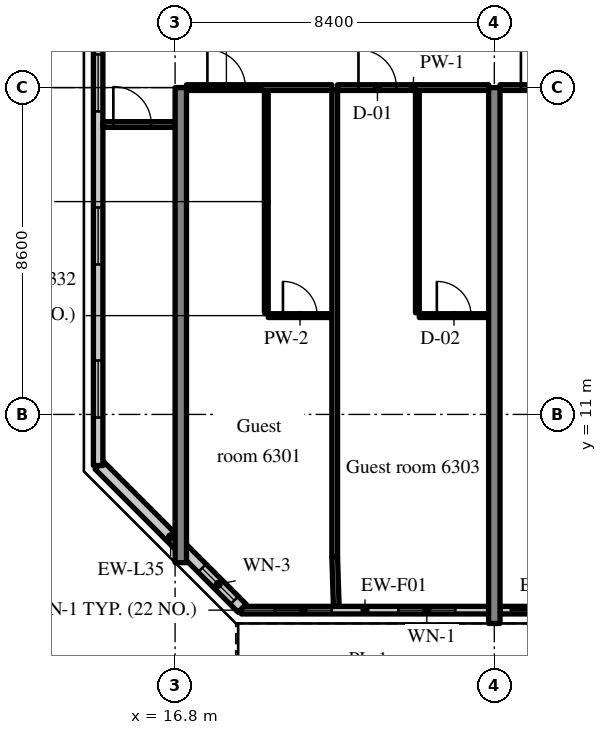
"""IFC4 building model, lengths in metres.
Left out: names, types, materials, properties, quantities, classifications, styles, units other than length and angle.
Written with IfcOpenShell. Run it as: python <this file> out.ifc"""

import sys

from ifc_helpers import new_model, si_unit, direction, frame, frame_2d, origin, place, context, subcontext, project, spatial, rectangle, extrude, source, transform, mapped, element, fill, save


model = new_model("IFC4")
c1 = context("Model", 3, precision=1e-05, world=origin(), true_north=direction((0.0, 1.0)))
c2 = subcontext(c1, "Body", "Model", "MODEL_VIEW")
j1 = project(units=[si_unit("LENGTHUNIT", "METRE"), si_unit("PLANEANGLEUNIT", "RADIAN")], contexts=[c1])
p1 = place(None, origin())
s1 = spatial("IfcSite", under=j1, at=p1, CompositionType="ELEMENT")
p2 = place(p1, origin())
s2 = spatial("IfcBuilding", under=s1, at=p2, CompositionType="ELEMENT")
p3 = place(p2, frame((0.0, 0.0, 260.8)))
s3 = spatial("IfcBuildingStorey", under=s2, at=p3, CompositionType="ELEMENT", Elevation=260.8)
m1 = source(origin(), c2, "Body", "SweptSolid", [
    extrude(rectangle(XDim=12.5, YDim=0.3, at=frame_2d((6.25, 0.0))), origin(), (0.0, 0.0, 1.0), 3.62),
])
p4 = place(p3, frame((16.95, 7.1, 0.0), z_axis=(0.0, 0.0, 1.0), x_axis=(0.0, 1.0, 0.0)))
e1 = element("IfcWall", 1, at=p4, inside=s3, PredefinedType="SHEAR", context=c2, shape_type="MappedRepresentation", body=[
    mapped(m1, transform((0.0, 0.0, 0.0), scale=1.0)),
])
m2 = source(origin(), c2, "Body", "SweptSolid", [
    extrude(rectangle(XDim=14.1, YDim=0.3, at=frame_2d((7.05, 0.0))), origin(), (0.0, 0.0, 1.0), 3.62),
])
p5 = place(p3, frame((25.2, 5.5, 0.0), z_axis=(0.0, 0.0, 1.0), x_axis=(0.0, 1.0, 0.0)))
e2 = element("IfcWall", 2, at=p5, inside=s3, PredefinedType="SHEAR", context=c2, shape_type="MappedRepresentation", body=[
    mapped(m2, transform((0.0, 0.0, 0.0), scale=1.0)),
])
m3 = source(origin(), c2, "Body", "SweptSolid", [
    extrude(rectangle(XDim=6.505, YDim=0.2, at=frame_2d((3.252, 0.0))), origin(), (0.0, 0.0, 1.0), 3.02),
])
p6 = place(p3, frame((18.545, 5.85, 0.0), z_axis=(0.0, 0.0, 1.0), x_axis=(1.0, 0.0, 0.0)))
e3 = element("IfcWall", 3, at=p6, inside=s3, PredefinedType="SOLIDWALL", context=c2, shape_type="MappedRepresentation", body=[
    mapped(m3, transform((0.0, 0.0, 0.0), scale=1.0)),
])
m4 = source(origin(), c2, "Body", "SweptSolid", [
    extrude(rectangle(XDim=1.5, YDim=1.5, at=frame_2d((0.75, 0.75))), frame((0.0, 0.11, 0.0), z_axis=(0.0, -1.0, 0.0), x_axis=(1.0, 0.0, 0.0)), (0.0, 0.0, 1.0), 0.22),
])
p7 = place(p6, frame((0.876, 0.0, 0.9)))
e4 = element("IfcOpeningElement", 4, at=p7, cuts=e3, PredefinedType="OPENING", context=c2, shape_type="MappedRepresentation", body=[
    mapped(m4, transform((0.0, 0.0, 0.0), scale=1.0)),
])
p8 = place(p6, frame((4.129, 0.0, 0.9)))
e5 = element("IfcOpeningElement", 5, at=p8, cuts=e3, PredefinedType="OPENING", context=c2, shape_type="MappedRepresentation", body=[
    mapped(m4, transform((0.0, 0.0, 0.0), scale=1.0)),
])
m5 = source(origin(), c2, "Body", "SweptSolid", [
    extrude(rectangle(XDim=8.1, YDim=0.2, at=frame_2d((4.05, 0.0))), origin(), (0.0, 0.0, 1.0), 3.02),
])
p9 = place(p3, frame((25.35, 5.85, 0.0), z_axis=(0.0, 0.0, 1.0), x_axis=(1.0, 0.0, 0.0)))
e6 = element("IfcWall", 6, at=p9, inside=s3, PredefinedType="SOLIDWALL", context=c2, shape_type="MappedRepresentation", body=[
    mapped(m5, transform((0.0, 0.0, 0.0), scale=1.0)),
])
m6 = source(origin(), c2, "Body", "SweptSolid", [
    extrude(rectangle(XDim=1.2, YDim=2.4, at=frame_2d((0.6, 1.2))), frame((0.0, 0.11, 0.0), z_axis=(0.0, -1.0, 0.0), x_axis=(1.0, 0.0, 0.0)), (0.0, 0.0, 1.0), 0.22),
])
p10 = place(p9, frame((0.25, 0.0, 0.0)))
e7 = element("IfcOpeningElement", 7, at=p10, cuts=e6, PredefinedType="OPENING", context=c2, shape_type="MappedRepresentation", body=[
    mapped(m6, transform((0.0, 0.0, 0.0), scale=1.0)),
])
p11 = place(p9, frame((2.3, 0.0, 0.9)))
e8 = element("IfcOpeningElement", 8, at=p11, cuts=e6, PredefinedType="OPENING", context=c2, shape_type="MappedRepresentation", body=[
    mapped(m4, transform((0.0, 0.0, 0.0), scale=1.0)),
])
p12 = place(p9, frame((4.3, 0.0, 0.0)))
e9 = element("IfcOpeningElement", 9, at=p12, cuts=e6, PredefinedType="OPENING", context=c2, shape_type="MappedRepresentation", body=[
    mapped(m6, transform((0.0, 0.0, 0.0), scale=1.0)),
])
p13 = place(p9, frame((6.35, 0.0, 0.9)))
e10 = element("IfcOpeningElement", 10, at=p13, cuts=e6, PredefinedType="OPENING", context=c2, shape_type="MappedRepresentation", body=[
    mapped(m4, transform((0.0, 0.0, 0.0), scale=1.0)),
])
m7 = source(origin(), c2, "Body", "SweptSolid", [
    extrude(rectangle(XDim=5.326, YDim=0.3, at=frame_2d((2.663, 0.0))), origin(), (0.0, 0.0, 1.0), 3.62),
])
p14 = place(p3, frame((14.8, 9.666, 0.0), z_axis=(0.0, 0.0, 1.0), x_axis=(0.707083859269, -0.707129702361, 0.0)))
e11 = element("IfcWall", 11, at=p14, inside=s3, PredefinedType="SOLIDWALL", context=c2, shape_type="MappedRepresentation", body=[
    mapped(m7, transform((0.0, 0.0, 0.0), scale=1.0)),
])
m8 = source(origin(), c2, "Body", "SweptSolid", [
    extrude(rectangle(XDim=1.2, YDim=1.5, at=frame_2d((0.6, 0.75))), frame((0.0, 0.16, 0.0), z_axis=(0.0, -1.0, 0.0), x_axis=(1.0, 0.0, 0.0)), (0.0, 0.0, 1.0), 0.32),
])
p15 = place(p14, frame((3.833, 0.0, 0.9)))
e12 = element("IfcOpeningElement", 12, at=p15, cuts=e11, PredefinedType="OPENING", context=c2, shape_type="MappedRepresentation", body=[
    mapped(m8, transform((0.0, 0.0, 0.0), scale=1.0)),
])
m9 = source(origin(), c2, "Body", "SweptSolid", [
    extrude(rectangle(XDim=28.189, YDim=0.25, at=frame_2d((14.095, 0.0))), origin(), (0.0, 0.0, 1.0), 3.62),
])
p16 = place(p3, frame((14.775, 37.845, 0.0), z_axis=(0.0, 0.0, 1.0), x_axis=(0.0, -1.0, 0.0)))
e13 = element("IfcWall", 13, at=p16, inside=s3, PredefinedType="SOLIDWALL", context=c2, shape_type="MappedRepresentation", body=[
    mapped(m9, transform((0.0, 0.0, 0.0), scale=1.0)),
])
m10 = source(origin(), c2, "Body", "SweptSolid", [
    extrude(rectangle(XDim=1.5, YDim=1.5, at=frame_2d((0.75, 0.75))), frame((0.0, 0.135, 0.0), z_axis=(0.0, -1.0, 0.0), x_axis=(1.0, 0.0, 0.0)), (0.0, 0.0, 1.0), 0.27),
])
p17 = place(p16, frame((1.263, 0.0, 0.9)))
e14 = element("IfcOpeningElement", 14, at=p17, cuts=e13, PredefinedType="OPENING", context=c2, shape_type="MappedRepresentation", body=[
    mapped(m10, transform((0.0, 0.0, 0.0), scale=1.0)),
])
p18 = place(p16, frame((5.291, 0.0, 0.9)))
e15 = element("IfcOpeningElement", 15, at=p18, cuts=e13, PredefinedType="OPENING", context=c2, shape_type="MappedRepresentation", body=[
    mapped(m10, transform((0.0, 0.0, 0.0), scale=1.0)),
])
p19 = place(p16, frame((9.318, 0.0, 0.9)))
e16 = element("IfcOpeningElement", 16, at=p19, cuts=e13, PredefinedType="OPENING", context=c2, shape_type="MappedRepresentation", body=[
    mapped(m10, transform((0.0, 0.0, 0.0), scale=1.0)),
])
p20 = place(p16, frame((13.345, 0.0, 0.9)))
e17 = element("IfcOpeningElement", 17, at=p20, cuts=e13, PredefinedType="OPENING", context=c2, shape_type="MappedRepresentation", body=[
    mapped(m10, transform((0.0, 0.0, 0.0), scale=1.0)),
])
p21 = place(p16, frame((17.372, 0.0, 0.9)))
e18 = element("IfcOpeningElement", 18, at=p21, cuts=e13, PredefinedType="OPENING", context=c2, shape_type="MappedRepresentation", body=[
    mapped(m10, transform((0.0, 0.0, 0.0), scale=1.0)),
])
p22 = place(p16, frame((21.399, 0.0, 0.9)))
e19 = element("IfcOpeningElement", 19, at=p22, cuts=e13, PredefinedType="OPENING", context=c2, shape_type="MappedRepresentation", body=[
    mapped(m10, transform((0.0, 0.0, 0.0), scale=1.0)),
])
p23 = place(p16, frame((25.426, 0.0, 0.9)))
e20 = element("IfcOpeningElement", 20, at=p23, cuts=e13, PredefinedType="OPENING", context=c2, shape_type="MappedRepresentation", body=[
    mapped(m10, transform((0.0, 0.0, 0.0), scale=1.0)),
])
m11 = source(origin(), c2, "Body", "SweptSolid", [
    extrude(rectangle(XDim=5.85, YDim=0.1, at=frame_2d((2.925, 0.0))), origin(), (0.0, 0.0, 1.0), 3.62),
])
p24 = place(p3, frame((19.2, 13.675, 0.0), z_axis=(0.0, 0.0, 1.0), x_axis=(0.0, 1.0, 0.0)))
e21 = element("IfcWall", 21, at=p24, inside=s3, PredefinedType="PARTITIONING", context=c2, shape_type="MappedRepresentation", body=[
    mapped(m11, transform((0.0, 0.0, 0.0), scale=1.0)),
])
m12 = source(origin(), c2, "Body", "SweptSolid", [
    extrude(rectangle(XDim=1.675, YDim=0.1, at=frame_2d((0.837, 0.0))), origin(), (0.0, 0.0, 1.0), 3.62),
])
p25 = place(p3, frame((19.25, 13.6, 0.0), z_axis=(0.0, 0.0, 1.0), x_axis=(1.0, 0.0, 0.0)))
e22 = element("IfcWall", 22, at=p25, inside=s3, PredefinedType="PARTITIONING", context=c2, shape_type="MappedRepresentation", body=[
    mapped(m12, transform((0.0, 0.0, 0.0), scale=1.0)),
])
m13 = source(origin(), c2, "Body", "SweptSolid", [
    extrude(rectangle(XDim=0.9, YDim=2.1, at=frame_2d((0.45, 1.05))), frame((0.0, 0.06, 0.0), z_axis=(0.0, -1.0, 0.0), x_axis=(1.0, 0.0, 0.0)), (0.0, 0.0, 1.0), 0.12),
])
p26 = place(p25, frame((0.388, 0.0, 0.0)))
e23 = element("IfcOpeningElement", 23, at=p26, cuts=e22, PredefinedType="OPENING", context=c2, shape_type="MappedRepresentation", body=[
    mapped(m13, transform((0.0, 0.0, 0.0), scale=1.0)),
])
m14 = source(origin(), c2, "Body", "SweptSolid", [
    extrude(rectangle(XDim=3.825, YDim=0.15, at=frame_2d((1.913, 0.0))), origin(), (0.0, 0.0, 1.0), 2.92),
])
p27 = place(p3, frame((17.1, 19.6, 0.0), z_axis=(0.0, 0.0, 1.0), x_axis=(1.0, 0.0, 0.0)))
e24 = element("IfcWall", 24, at=p27, inside=s3, PredefinedType="PARTITIONING", context=c2, shape_type="MappedRepresentation", body=[
    mapped(m14, transform((0.0, 0.0, 0.0), scale=1.0)),
])
m15 = source(origin(), c2, "Body", "SweptSolid", [
    extrude(rectangle(XDim=1.0, YDim=2.1, at=frame_2d((0.5, 1.05))), frame((0.0, 0.085, 0.0), z_axis=(0.0, -1.0, 0.0), x_axis=(1.0, 0.0, 0.0)), (0.0, 0.0, 1.0), 0.17),
])
p28 = place(p27, frame((0.55, 0.0, 0.0)))
e25 = element("IfcOpeningElement", 25, at=p28, cuts=e24, PredefinedType="OPENING", context=c2, shape_type="MappedRepresentation", body=[
    mapped(m15, transform((0.0, 0.0, 0.0), scale=1.0)),
])
p29 = place(p3, frame((23.175, 13.675, 0.0), z_axis=(0.0, 0.0, 1.0), x_axis=(0.0, 1.0, 0.0)))
e26 = element("IfcWall", 26, at=p29, inside=s3, PredefinedType="PARTITIONING", context=c2, shape_type="MappedRepresentation", body=[
    mapped(m11, transform((0.0, 0.0, 0.0), scale=1.0)),
])
m16 = source(origin(), c2, "Body", "SweptSolid", [
    extrude(rectangle(XDim=1.825, YDim=0.1, at=frame_2d((0.913, 0.0))), origin(), (0.0, 0.0, 1.0), 3.62),
])
p30 = place(p3, frame((23.225, 13.6, 0.0), z_axis=(0.0, 0.0, 1.0), x_axis=(1.0, 0.0, 0.0)))
e27 = element("IfcWall", 27, at=p30, inside=s3, PredefinedType="PARTITIONING", context=c2, shape_type="MappedRepresentation", body=[
    mapped(m16, transform((0.0, 0.0, 0.0), scale=1.0)),
])
p31 = place(p30, frame((0.463, 0.0, 0.0)))
e28 = element("IfcOpeningElement", 28, at=p31, cuts=e27, PredefinedType="OPENING", context=c2, shape_type="MappedRepresentation", body=[
    mapped(m13, transform((0.0, 0.0, 0.0), scale=1.0)),
])
m17 = source(origin(), c2, "Body", "SweptSolid", [
    extrude(rectangle(XDim=3.975, YDim=0.15, at=frame_2d((1.988, 0.0))), origin(), (0.0, 0.0, 1.0), 2.92),
])
p32 = place(p3, frame((21.075, 19.6, 0.0), z_axis=(0.0, 0.0, 1.0), x_axis=(1.0, 0.0, 0.0)))
e29 = element("IfcWall", 29, at=p32, inside=s3, PredefinedType="PARTITIONING", context=c2, shape_type="MappedRepresentation", body=[
    mapped(m17, transform((0.0, 0.0, 0.0), scale=1.0)),
])
p33 = place(p32, frame((0.55, 0.0, 0.0)))
e30 = element("IfcOpeningElement", 30, at=p33, cuts=e29, PredefinedType="OPENING", context=c2, shape_type="MappedRepresentation", body=[
    mapped(m15, transform((0.0, 0.0, 0.0), scale=1.0)),
])
m18 = source(origin(), c2, "Body", "SweptSolid", [
    extrude(rectangle(XDim=12.275, YDim=0.15, at=frame_2d((6.137, 0.0))), origin(), (0.0, 0.0, 1.0), 3.62),
])
p34 = place(p3, frame((21.0, 7.25, 0.0), z_axis=(0.0, 0.0, 1.0), x_axis=(0.0, 1.0, 0.0)))
e31 = element("IfcWall", 31, at=p34, inside=s3, PredefinedType="PARTITIONING", context=c2, shape_type="MappedRepresentation", body=[
    mapped(m18, transform((0.0, 0.0, 0.0), scale=1.0)),
])
m19 = source(origin(), c2, "Body", "SweptSolid", [
    extrude(rectangle(XDim=8.1, YDim=0.15, at=frame_2d((4.05, 0.0))), origin(), (0.0, 0.0, 1.0), 2.92),
])
p35 = place(p3, frame((25.35, 19.6, 0.0), z_axis=(0.0, 0.0, 1.0), x_axis=(1.0, 0.0, 0.0)))
e32 = element("IfcWall", 32, at=p35, inside=s3, PredefinedType="PARTITIONING", context=c2, shape_type="MappedRepresentation", body=[
    mapped(m19, transform((0.0, 0.0, 0.0), scale=1.0)),
])
p36 = place(p35, frame((0.55, 0.0, 0.0)))
e33 = element("IfcOpeningElement", 33, at=p36, cuts=e32, PredefinedType="OPENING", context=c2, shape_type="MappedRepresentation", body=[
    mapped(m15, transform((0.0, 0.0, 0.0), scale=1.0)),
])
m20 = source(origin(), c2, "Body", "SweptSolid", [
    extrude(rectangle(XDim=1.9, YDim=0.15, at=frame_2d((0.95, 0.0))), origin(), (0.0, 0.0, 1.0), 2.92),
])
p37 = place(p3, frame((14.9, 18.628, 0.0), z_axis=(0.0, 0.0, 1.0), x_axis=(1.0, 0.0, 0.0)))
e34 = element("IfcWall", 34, at=p37, inside=s3, PredefinedType="PARTITIONING", context=c2, shape_type="MappedRepresentation", body=[
    mapped(m20, transform((0.0, 0.0, 0.0), scale=1.0)),
])
p38 = place(p37, frame((0.275, 0.0, 0.0)))
e35 = element("IfcOpeningElement", 35, at=p38, cuts=e34, PredefinedType="OPENING", context=c2, shape_type="MappedRepresentation", body=[
    mapped(m15, transform((0.0, 0.0, 0.0), scale=1.0)),
])
m21 = source(origin(), c2, "Body", "SweptSolid", [
    extrude(rectangle(XDim=1.301, YDim=0.15, at=frame_2d((0.65, 0.0))), origin(), (0.0, 0.0, 1.0), 3.62),
])
p39 = place(p3, frame((21.041, 5.95, 0.0), z_axis=(0.0, 0.0, 1.0), x_axis=(-0.031533606063, 0.999502692187, 0.0)))
e36 = element("IfcWall", 36, at=p39, inside=s3, PredefinedType="PARTITIONING", context=c2, shape_type="MappedRepresentation", body=[
    mapped(m21, transform((0.0, 0.0, 0.0), scale=1.0)),
])
m22 = source(origin(), c2, "Body", "SweptSolid", [
    extrude(rectangle(XDim=1.5, YDim=1.5, at=frame_2d((0.75, 0.75))), frame((0.0, 0.03, 0.0), z_axis=(0.0, -1.0, 0.0), x_axis=(1.0, 0.0, 0.0)), (0.0, 0.0, 1.0), 0.06),
])
p40 = place(p7, origin())
e37 = element("IfcWindow", 37, at=p40, inside=s3, PartitioningType="SINGLE_PANEL", PredefinedType="WINDOW", context=c2, shape_type="MappedRepresentation", body=[
    mapped(m22, transform((0.0, 0.0, 0.0), scale=1.0)),
])
fill(e4, e37)
p41 = place(p8, origin())
e38 = element("IfcWindow", 38, at=p41, inside=s3, PartitioningType="SINGLE_PANEL", PredefinedType="WINDOW", context=c2, shape_type="MappedRepresentation", body=[
    mapped(m22, transform((0.0, 0.0, 0.0), scale=1.0)),
])
fill(e5, e38)
m23 = source(origin(), c2, "Body", "SweptSolid", [
    extrude(rectangle(XDim=1.2, YDim=2.4, at=frame_2d((0.6, 1.2))), frame((0.0, 0.025, 0.0), z_axis=(0.0, -1.0, 0.0), x_axis=(1.0, 0.0, 0.0)), (0.0, 0.0, 1.0), 0.05),
])
p42 = place(p10, origin())
e39 = element("IfcDoor", 39, at=p42, inside=s3, OperationType="SLIDING_TO_LEFT", PredefinedType="DOOR", context=c2, shape_type="MappedRepresentation", body=[
    mapped(m23, transform((0.0, 0.0, 0.0), scale=1.0)),
])
fill(e7, e39)
m24 = source(origin(), c2, "Body", "SweptSolid", [
    extrude(rectangle(XDim=1.2, YDim=1.5, at=frame_2d((0.6, 0.75))), frame((0.0, 0.03, 0.0), z_axis=(0.0, -1.0, 0.0), x_axis=(1.0, 0.0, 0.0)), (0.0, 0.0, 1.0), 0.06),
])
p43 = place(p15, origin())
e40 = element("IfcWindow", 40, at=p43, inside=s3, PartitioningType="SINGLE_PANEL", PredefinedType="WINDOW", context=c2, shape_type="MappedRepresentation", body=[
    mapped(m24, transform((0.0, 0.0, 0.0), scale=1.0)),
])
fill(e12, e40)
p44 = place(p21, origin())
e41 = element("IfcWindow", 41, at=p44, inside=s3, PartitioningType="SINGLE_PANEL", PredefinedType="WINDOW", context=c2, shape_type="MappedRepresentation", body=[
    mapped(m22, transform((0.0, 0.0, 0.0), scale=1.0)),
])
fill(e18, e41)
p45 = place(p22, origin())
e42 = element("IfcWindow", 42, at=p45, inside=s3, PartitioningType="SINGLE_PANEL", PredefinedType="WINDOW", context=c2, shape_type="MappedRepresentation", body=[
    mapped(m22, transform((0.0, 0.0, 0.0), scale=1.0)),
])
fill(e19, e42)
p46 = place(p23, origin())
e43 = element("IfcWindow", 43, at=p46, inside=s3, PartitioningType="SINGLE_PANEL", PredefinedType="WINDOW", context=c2, shape_type="MappedRepresentation", body=[
    mapped(m22, transform((0.0, 0.0, 0.0), scale=1.0)),
])
fill(e20, e43)
m25 = source(origin(), c2, "Body", "SweptSolid", [
    extrude(rectangle(XDim=0.9, YDim=2.1, at=frame_2d((0.45, 1.05))), frame((0.0, 0.025, 0.0), z_axis=(0.0, -1.0, 0.0), x_axis=(1.0, 0.0, 0.0)), (0.0, 0.0, 1.0), 0.05),
])
p47 = place(p26, origin())
e44 = element("IfcDoor", 44, at=p47, inside=s3, OperationType="SINGLE_SWING_LEFT", PredefinedType="DOOR", context=c2, shape_type="MappedRepresentation", body=[
    mapped(m25, transform((0.0, 0.0, 0.0), scale=1.0)),
])
fill(e23, e44)
m26 = source(origin(), c2, "Body", "SweptSolid", [
    extrude(rectangle(XDim=1.0, YDim=2.1, at=frame_2d((0.5, 1.05))), frame((0.0, 0.025, 0.0), z_axis=(0.0, -1.0, 0.0), x_axis=(1.0, 0.0, 0.0)), (0.0, 0.0, 1.0), 0.05),
])
p48 = place(p28, origin())
e45 = element("IfcDoor", 45, at=p48, inside=s3, OperationType="SINGLE_SWING_LEFT", PredefinedType="DOOR", context=c2, shape_type="MappedRepresentation", body=[
    mapped(m26, transform((0.0, 0.0, 0.0), scale=1.0)),
])
fill(e25, e45)
p49 = place(p31, origin())
e46 = element("IfcDoor", 46, at=p49, inside=s3, OperationType="SINGLE_SWING_LEFT", PredefinedType="DOOR", context=c2, shape_type="MappedRepresentation", body=[
    mapped(m25, transform((0.0, 0.0, 0.0), scale=1.0)),
])
fill(e28, e46)
p50 = place(p33, origin())
e47 = element("IfcDoor", 47, at=p50, inside=s3, OperationType="SINGLE_SWING_LEFT", PredefinedType="DOOR", context=c2, shape_type="MappedRepresentation", body=[
    mapped(m26, transform((0.0, 0.0, 0.0), scale=1.0)),
])
fill(e30, e47)
p51 = place(p36, origin())
e48 = element("IfcDoor", 48, at=p51, inside=s3, OperationType="SINGLE_SWING_LEFT", PredefinedType="DOOR", context=c2, shape_type="MappedRepresentation", body=[
    mapped(m26, transform((0.0, 0.0, 0.0), scale=1.0)),
])
fill(e33, e48)
p52 = place(p38, origin())
e49 = element("IfcDoor", 49, at=p52, inside=s3, OperationType="SINGLE_SWING_LEFT", PredefinedType="DOOR", context=c2, shape_type="MappedRepresentation", body=[
    mapped(m26, transform((0.0, 0.0, 0.0), scale=1.0)),
])
fill(e35, e49)
save(model, sys.argv[1])
